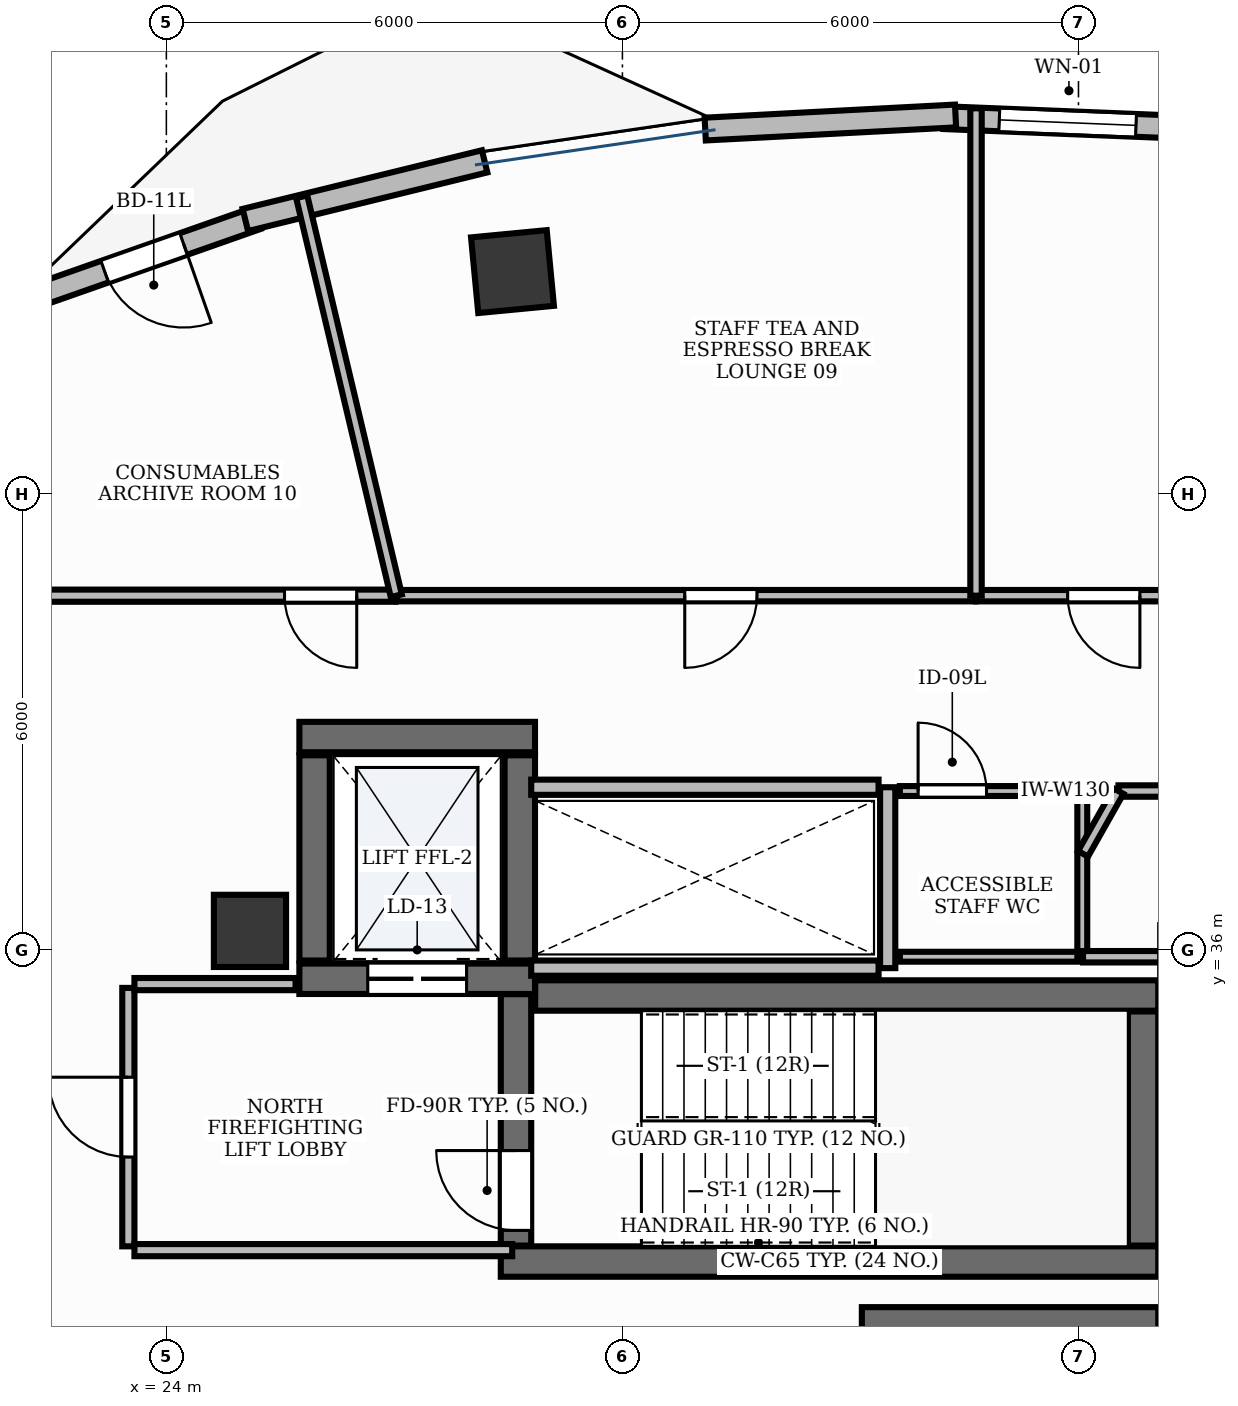
"""IFC4 building model, lengths in metres.
Left out: names, types, materials, properties, quantities, classifications, styles, units other than length and angle.
Written with IfcOpenShell. Run it as: python <this file> out.ifc"""

import sys

from ifc_helpers import new_model, si_unit, direction, frame, frame_2d, origin, origin_2d, place, context, subcontext, project, spatial, rectangle, extrude, element, fill, save


model = new_model("IFC4")
c1 = context("Model", 3, precision=1e-05, world=origin(), true_north=direction((0.0, 1.0)))
c2 = subcontext(c1, "Body", "Model", "MODEL_VIEW")
j1 = project(units=[si_unit("LENGTHUNIT", "METRE"), si_unit("PLANEANGLEUNIT", "RADIAN")], contexts=[c1])
p1 = place(None, origin())
s1 = spatial("IfcSite", under=j1, at=p1, CompositionType="ELEMENT")
p2 = place(p1, origin())
s2 = spatial("IfcBuilding", under=s1, at=p2, CompositionType="ELEMENT")
p3 = place(p2, frame((0.0, 0.0, 204.6)))
s3 = spatial("IfcBuildingStorey", under=s2, at=p3, CompositionType="ELEMENT", Elevation=204.6)
p4 = place(p3, frame((28.852, 35.4, 0.0), z_axis=(0.0, 0.0, 1.0), x_axis=(1.0, 0.0, 0.0)))
e1 = element("IfcWall", 1, at=p4, inside=s3, PredefinedType="SHEAR", context=c2, shape_type="SweptSolid", body=[
    extrude(rectangle(XDim=8.198, YDim=0.4, at=frame_2d((4.099, 0.0))), origin(), (0.0, 0.0, 1.0), 3.9),
])
p5 = place(p3, frame((28.4, 31.9, 0.0), z_axis=(0.0, 0.0, 1.0), x_axis=(1.0, 0.0, 0.0)))
e2 = element("IfcWall", 2, at=p5, inside=s3, PredefinedType="SHEAR", context=c2, shape_type="SweptSolid", body=[
    extrude(rectangle(XDim=8.65, YDim=0.4, at=frame_2d((4.325, 0.0))), origin(), (0.0, 0.0, 1.0), 3.9),
])
p6 = place(p3, frame((36.85, 32.11, 0.0), z_axis=(0.0, 0.0, 1.0), x_axis=(0.0, 1.0, 0.0)))
e3 = element("IfcWall", 3, at=p6, inside=s3, PredefinedType="SHEAR", context=c2, shape_type="SweptSolid", body=[
    extrude(rectangle(XDim=3.08, YDim=0.4, at=frame_2d((1.54, 0.0))), origin(), (0.0, 0.0, 1.0), 3.9),
])
p7 = place(p3, frame((28.6, 32.11, 0.0), z_axis=(0.0, 0.0, 1.0), x_axis=(0.0, 1.0, 0.0)))
e4 = element("IfcWall", 4, at=p7, inside=s3, PredefinedType="SHEAR", context=c2, shape_type="SweptSolid", body=[
    extrude(rectangle(XDim=3.308, YDim=0.4, at=frame_2d((1.654, 0.0))), origin(), (0.0, 0.0, 1.0), 3.9),
])
p8 = place(p7, frame((0.2, 0.0, 0.0)))
e5 = element("IfcOpeningElement", 5, at=p8, cuts=e4, PredefinedType="OPENING", context=c2, shape_type="SweptSolid", body=[
    extrude(rectangle(XDim=1.05, YDim=2.15, at=frame_2d((0.525, 1.075))), frame((0.0, 0.215, 0.0), z_axis=(0.0, -1.0, 0.0), x_axis=(1.0, 0.0, 0.0)), (0.0, 0.0, 1.0), 0.43),
])
p9 = place(p3, frame((33.15, 31.1, 0.0), z_axis=(0.0, 0.0, 1.0), x_axis=(1.0, 0.0, 0.0)))
e6 = element("IfcWall", 6, at=p9, inside=s3, PredefinedType="SHEAR", context=c2, shape_type="SweptSolid", body=[
    extrude(rectangle(XDim=3.9, YDim=0.4, at=frame_2d((1.95, 0.0))), origin(), (0.0, 0.0, 1.0), 3.9),
])
p10 = place(p3, frame((25.75, 38.8, 0.0), z_axis=(0.0, 0.0, 1.0), x_axis=(1.0, 0.0, 0.0)))
e7 = element("IfcWall", 7, at=p10, inside=s3, PredefinedType="SHEAR", context=c2, shape_type="SweptSolid", body=[
    extrude(rectangle(XDim=3.1, YDim=0.4, at=frame_2d((1.55, 0.0))), origin(), (0.0, 0.0, 1.0), 3.9),
])
p11 = place(p3, frame((25.75, 35.62, 0.0), z_axis=(0.0, 0.0, 1.0), x_axis=(1.0, 0.0, 0.0)))
e8 = element("IfcWall", 8, at=p11, inside=s3, PredefinedType="SHEAR", context=c2, shape_type="SweptSolid", body=[
    extrude(rectangle(XDim=3.1, YDim=0.4, at=frame_2d((1.55, 0.0))), origin(), (0.0, 0.0, 1.0), 3.9),
])
p12 = place(p11, frame((0.9, 0.0, 0.0)))
e9 = element("IfcOpeningElement", 9, at=p12, cuts=e8, PredefinedType="OPENING", context=c2, shape_type="SweptSolid", body=[
    extrude(rectangle(XDim=1.3, YDim=2.2, at=frame_2d((0.65, 1.1))), frame((0.0, 0.215, 0.0), z_axis=(0.0, -1.0, 0.0), x_axis=(1.0, 0.0, 0.0)), (0.0, 0.0, 1.0), 0.43),
])
for number, where, z_axis, x_axis in (
    (10, (25.95, 35.86, 0.0), (0.0, 0.0, 1.0), (0.0, 1.0, 0.0)),
    (11, (28.65, 35.86, 0.0), (0.0, 0.0, 1.0), (0.0, 1.0, 0.0)),
):
    element("IfcWall", number, at=place(p3, frame(where, z_axis=z_axis, x_axis=x_axis)), inside=s3, PredefinedType="SHEAR", context=c2, shape_type="SweptSolid", body=[
        extrude(rectangle(XDim=2.7, YDim=0.4, at=frame_2d((1.35, 0.0))), origin(), (0.0, 0.0, 1.0), 3.9),
    ])
p13 = place(p3, frame((25.1, 36.25, -0.0), z_axis=(0.0, 0.0, 1.0), x_axis=(1.0, 0.0, 0.0)))
e12 = element("IfcColumn", 12, at=p13, inside=s3, PredefinedType="PILASTER", context=c2, shape_type="SweptSolid", body=[
    extrude(rectangle(XDim=0.95, YDim=0.95, at=origin_2d()), origin(), (0.0, 0.0, 1.0), 3.901),
])
p14 = place(p3, frame((28.554, 44.924, -0.0), z_axis=(0.0, 0.0, 1.0), x_axis=(0.995462868748, 0.095150811579, 0.0)))
e13 = element("IfcColumn", 13, at=p14, inside=s3, PredefinedType="COLUMN", context=c2, shape_type="SweptSolid", body=[
    extrude(rectangle(XDim=1.0, YDim=1.0, at=origin_2d()), origin(), (0.0, 0.0, 1.0), 3.901),
])
p15 = place(p3, frame((37.486, 46.818, 0.0), z_axis=(0.0, 0.0, 1.0), x_axis=(-0.999187621273, 0.040300092979, 0.0)))
e14 = element("IfcWall", 14, at=p15, inside=s3, PredefinedType="STANDARD", context=c2, shape_type="SweptSolid", body=[
    extrude(rectangle(XDim=3.259, YDim=0.3, at=frame_2d((1.63, 0.0))), origin(), (0.0, 0.0, 1.0), 3.9),
])
p16 = place(p15, frame((0.729, 0.0, 0.9)))
e15 = element("IfcOpeningElement", 15, at=p16, cuts=e14, PredefinedType="OPENING", context=c2, shape_type="SweptSolid", body=[
    extrude(rectangle(XDim=1.8, YDim=2.1, at=frame_2d((0.9, 1.05))), frame((0.0, 0.165, 0.0), z_axis=(0.0, -1.0, 0.0), x_axis=(1.0, 0.0, 0.0)), (0.0, 0.0, 1.0), 0.33),
])
p17 = place(p3, frame((25.193, 45.627, 0.0), z_axis=(0.0, 0.0, 1.0), x_axis=(-0.94341621231, -0.331610992506, 0.0)))
e16 = element("IfcWall", 16, at=p17, inside=s3, PredefinedType="STANDARD", context=c2, shape_type="SweptSolid", body=[
    extrude(rectangle(XDim=3.148, YDim=0.3, at=frame_2d((1.574, 0.0))), origin(), (0.0, 0.0, 1.0), 3.9),
])
p18 = place(p17, frame((1.024, 0.0, 0.0)))
e17 = element("IfcOpeningElement", 17, at=p18, cuts=e16, PredefinedType="OPENING", context=c2, shape_type="SweptSolid", body=[
    extrude(rectangle(XDim=1.1, YDim=2.15, at=frame_2d((0.55, 1.075))), frame((0.0, 0.165, 0.0), z_axis=(0.0, -1.0, 0.0), x_axis=(1.0, 0.0, 0.0)), (0.0, 0.0, 1.0), 0.33),
])
p19 = place(p3, frame((34.383, 46.971, 0.0), z_axis=(0.0, 0.0, 1.0), x_axis=(-0.998633327395, -0.052263538113, 0.0)))
e18 = element("IfcWall", 18, at=p19, inside=s3, PredefinedType="STANDARD", context=c2, shape_type="SweptSolid", body=[
    extrude(rectangle(XDim=3.298, YDim=0.3, at=frame_2d((1.649, 0.0))), origin(), (0.0, 0.0, 1.0), 3.9),
])
p20 = place(p3, frame((28.187, 46.374, 0.0), z_axis=(0.0, 0.0, 1.0), x_axis=(-0.971279195983, -0.237942689423, 0.0)))
e19 = element("IfcWall", 19, at=p20, inside=s3, PredefinedType="STANDARD", context=c2, shape_type="SweptSolid", body=[
    extrude(rectangle(XDim=3.241, YDim=0.3, at=frame_2d((1.621, 0.0))), origin(), (0.0, 0.0, 1.0), 3.9),
])
p21 = place(p3, frame((33.49, 35.76, 0.0), z_axis=(0.0, 0.0, 1.0), x_axis=(0.0, 1.0, 0.0)))
e20 = element("IfcWall", 20, at=p21, inside=s3, PredefinedType="PARTITIONING", context=c2, shape_type="SweptSolid", body=[
    extrude(rectangle(XDim=2.38, YDim=0.2, at=frame_2d((1.19, 0.0))), origin(), (0.0, 0.0, 1.0), 2.91),
])
for number, where, z_axis, x_axis in (
    (21, (28.8, 35.76, 0.0), (0.0, 0.0, 1.0), (1.0, 0.0, 0.0)),
    (22, (28.8, 38.14, 0.0), (0.0, 0.0, 1.0), (1.0, 0.0, 0.0)),
):
    element("IfcWall", number, at=place(p3, frame(where, z_axis=z_axis, x_axis=x_axis)), inside=s3, PredefinedType="PARTITIONING", context=c2, shape_type="SweptSolid", body=[
        extrude(rectangle(XDim=4.57, YDim=0.2, at=frame_2d((2.285, 0.0))), origin(), (0.0, 0.0, 1.0), 2.91),
    ])
p22 = place(p3, frame((23.5, 32.1, 0.0), z_axis=(0.0, 0.0, 1.0), x_axis=(0.0, 1.0, 0.0)))
e23 = element("IfcWall", 23, at=p22, inside=s3, PredefinedType="PARTITIONING", context=c2, shape_type="SweptSolid", body=[
    extrude(rectangle(XDim=3.4, YDim=0.16, at=frame_2d((1.7, 0.0))), origin(), (0.0, 0.0, 1.0), 2.91),
])
p23 = place(p22, frame((1.175, 0.0, 0.0)))
e24 = element("IfcOpeningElement", 24, at=p23, cuts=e23, PredefinedType="OPENING", context=c2, shape_type="SweptSolid", body=[
    extrude(rectangle(XDim=1.05, YDim=2.15, at=frame_2d((0.525, 1.075))), frame((0.0, 0.095, 0.0), z_axis=(0.0, -1.0, 0.0), x_axis=(1.0, 0.0, 0.0)), (0.0, 0.0, 1.0), 0.19),
])
p24 = place(p3, frame((23.58, 32.05, 0.0), z_axis=(0.0, 0.0, 1.0), x_axis=(1.0, 0.0, 0.0)))
e25 = element("IfcWall", 25, at=p24, inside=s3, PredefinedType="PARTITIONING", context=c2, shape_type="SweptSolid", body=[
    extrude(rectangle(XDim=4.97, YDim=0.16, at=frame_2d((2.485, 0.0))), origin(), (0.0, 0.0, 1.0), 2.91),
])
p25 = place(p3, frame((23.58, 35.55, 0.0), z_axis=(0.0, 0.0, 1.0), x_axis=(1.0, 0.0, 0.0)))
e26 = element("IfcWall", 26, at=p25, inside=s3, PredefinedType="PARTITIONING", context=c2, shape_type="SweptSolid", body=[
    extrude(rectangle(XDim=2.12, YDim=0.16, at=frame_2d((1.06, 0.0))), origin(), (0.0, 0.0, 1.0), 2.91),
])
p26 = place(p3, frame((33.65, 38.09, 0.0), z_axis=(0.0, 0.0, 1.0), x_axis=(1.0, 0.0, 0.0)))
e27 = element("IfcWall", 27, at=p26, inside=s3, PredefinedType="PARTITIONING", context=c2, shape_type="SweptSolid", body=[
    extrude(rectangle(XDim=2.4, YDim=0.13, at=frame_2d((1.2, 0.0))), origin(), (0.0, 0.0, 1.0), 2.91),
])
p27 = place(p26, frame((0.24, 0.0, 0.0)))
e28 = element("IfcOpeningElement", 28, at=p27, cuts=e27, PredefinedType="OPENING", context=c2, shape_type="SweptSolid", body=[
    extrude(rectangle(XDim=0.9, YDim=2.15, at=frame_2d((0.45, 1.075))), frame((0.0, 0.08, 0.0), z_axis=(0.0, -1.0, 0.0), x_axis=(1.0, 0.0, 0.0)), (0.0, 0.0, 1.0), 0.16),
])
p28 = place(p3, frame((37.2, 40.66, 0.0), z_axis=(0.0, 0.0, 1.0), x_axis=(-1.0, 0.0, 0.0)))
e29 = element("IfcWall", 29, at=p28, inside=s3, PredefinedType="PARTITIONING", context=c2, shape_type="SweptSolid", body=[
    extrude(rectangle(XDim=2.548, YDim=0.15, at=frame_2d((1.274, 0.0))), origin(), (0.0, 0.0, 1.0), 2.91),
])
p29 = place(p28, frame((0.392, 0.0, 0.0)))
e30 = element("IfcOpeningElement", 30, at=p29, cuts=e29, PredefinedType="OPENING", context=c2, shape_type="SweptSolid", body=[
    extrude(rectangle(XDim=0.95, YDim=2.15, at=frame_2d((0.475, 1.075))), frame((0.0, 0.09, 0.0), z_axis=(0.0, -1.0, 0.0), x_axis=(1.0, 0.0, 0.0)), (0.0, 0.0, 1.0), 0.18),
])
p30 = place(p3, frame((34.642, 40.66, 0.0), z_axis=(0.0, 0.0, 1.0), x_axis=(-1.0, 0.0, 0.0)))
e31 = element("IfcWall", 31, at=p30, inside=s3, PredefinedType="PARTITIONING", context=c2, shape_type="SweptSolid", body=[
    extrude(rectangle(XDim=7.617, YDim=0.15, at=frame_2d((3.809, 0.0))), origin(), (0.0, 0.0, 1.0), 2.91),
])
p31 = place(p30, frame((2.872, 0.0, 0.0)))
e32 = element("IfcOpeningElement", 32, at=p31, cuts=e31, PredefinedType="OPENING", context=c2, shape_type="SweptSolid", body=[
    extrude(rectangle(XDim=0.95, YDim=2.15, at=frame_2d((0.475, 1.075))), frame((0.0, 0.09, 0.0), z_axis=(0.0, -1.0, 0.0), x_axis=(1.0, 0.0, 0.0)), (0.0, 0.0, 1.0), 0.18),
])
p32 = place(p3, frame((27.015, 40.66, 0.0), z_axis=(0.0, 0.0, 1.0), x_axis=(-1.0, 0.0, 0.0)))
e33 = element("IfcWall", 33, at=p32, inside=s3, PredefinedType="PARTITIONING", context=c2, shape_type="SweptSolid", body=[
    extrude(rectangle(XDim=5.265, YDim=0.16, at=frame_2d((2.632, 0.0))), origin(), (0.0, 0.0, 1.0), 2.91),
])
p33 = place(p32, frame((0.51, 0.0, 0.0)))
e34 = element("IfcOpeningElement", 34, at=p33, cuts=e33, PredefinedType="OPENING", context=c2, shape_type="SweptSolid", body=[
    extrude(rectangle(XDim=0.95, YDim=2.15, at=frame_2d((0.475, 1.075))), frame((0.0, 0.095, 0.0), z_axis=(0.0, -1.0, 0.0), x_axis=(1.0, 0.0, 0.0)), (0.0, 0.0, 1.0), 0.19),
])
p34 = place(p3, frame((36.05, 35.91, 0.0), z_axis=(0.0, 0.0, 1.0), x_axis=(-1.0, 0.0, 0.0)))
e35 = element("IfcWall", 35, at=p34, inside=s3, PredefinedType="PARTITIONING", context=c2, shape_type="SweptSolid", body=[
    extrude(rectangle(XDim=2.4, YDim=0.13, at=frame_2d((1.2, 0.0))), origin(), (0.0, 0.0, 1.0), 2.91),
])
p35 = place(p3, frame((36.05, 38.09, 0.0), z_axis=(0.0, 0.0, 1.0), x_axis=(0.0, -1.0, 0.0)))
e36 = element("IfcWall", 36, at=p35, inside=s3, PredefinedType="PARTITIONING", context=c2, shape_type="SweptSolid", body=[
    extrude(rectangle(XDim=2.18, YDim=0.13, at=frame_2d((1.09, 0.0))), origin(), (0.0, 0.0, 1.0), 2.91),
])
p36 = place(p3, frame((36.526, 38.09, 0.0), z_axis=(0.0, 0.0, 1.0), x_axis=(1.0, 0.0, 0.0)))
e37 = element("IfcWall", 37, at=p36, inside=s3, PredefinedType="PARTITIONING", context=c2, shape_type="SweptSolid", body=[
    extrude(rectangle(XDim=0.674, YDim=0.15, at=frame_2d((0.337, 0.0))), origin(), (0.0, 0.0, 1.0), 2.91),
])
p37 = place(p3, frame((34.652, 40.66, 0.0), z_axis=(0.0, 0.0, 1.0), x_axis=(0.0, 1.0, 0.0)))
e38 = element("IfcWall", 38, at=p37, inside=s3, PredefinedType="PARTITIONING", context=c2, shape_type="SweptSolid", body=[
    extrude(rectangle(XDim=6.412, YDim=0.15, at=frame_2d((3.206, 0.0))), origin(), (0.0, 0.0, 1.0), 2.91),
])
p38 = place(p3, frame((37.35, 35.91, 0.0), z_axis=(0.0, 0.0, 1.0), x_axis=(-1.0, 0.0, 0.0)))
e39 = element("IfcWall", 39, at=p38, inside=s3, PredefinedType="PARTITIONING", context=c2, shape_type="SweptSolid", body=[
    extrude(rectangle(XDim=1.29, YDim=0.15, at=frame_2d((0.645, 0.0))), origin(), (0.0, 0.0, 1.0), 2.91),
])
p39 = place(p3, frame((36.06, 37.264, 0.0), z_axis=(0.0, 0.0, 1.0), x_axis=(0.491641592744, 0.8707976483, 0.0)))
e40 = element("IfcWall", 40, at=p39, inside=s3, PredefinedType="PARTITIONING", context=c2, shape_type="SweptSolid", body=[
    extrude(rectangle(XDim=0.948, YDim=0.15, at=frame_2d((0.474, 0.0))), origin(), (0.0, 0.0, 1.0), 2.91),
])
p40 = place(p3, frame((27.025, 40.66, 0.0), z_axis=(0.0, 0.0, 1.0), x_axis=(-0.230673918081, 0.973031111279, 0.0)))
e41 = element("IfcWall", 41, at=p40, inside=s3, PredefinedType="PARTITIONING", context=c2, shape_type="SweptSolid", body=[
    extrude(rectangle(XDim=5.394, YDim=0.15, at=frame_2d((2.697, 0.0))), origin(), (0.0, 0.0, 1.0), 2.91),
])
p41 = place(p16, origin())
e42 = element("IfcWindow", 42, at=p41, inside=s3, PartitioningType="SINGLE_PANEL", PredefinedType="WINDOW", context=c2, shape_type="SweptSolid", body=[
    extrude(rectangle(XDim=1.8, YDim=2.1, at=frame_2d((0.9, 1.05))), frame((0.0, 0.03, 0.0), z_axis=(0.0, -1.0, 0.0), x_axis=(1.0, 0.0, 0.0)), (0.0, 0.0, 1.0), 0.06),
])
fill(e15, e42)
p42 = place(p18, origin())
e43 = element("IfcDoor", 43, at=p42, inside=s3, OperationType="SINGLE_SWING_LEFT", PredefinedType="DOOR", context=c2, shape_type="SweptSolid", body=[
    extrude(rectangle(XDim=1.1, YDim=2.15, at=frame_2d((0.55, 1.075))), frame((0.0, 0.025, 0.0), z_axis=(0.0, -1.0, 0.0), x_axis=(1.0, 0.0, 0.0)), (0.0, 0.0, 1.0), 0.05),
])
fill(e17, e43)
p43 = place(p8, origin())
e44 = element("IfcDoor", 44, at=p43, inside=s3, OperationType="SINGLE_SWING_RIGHT", PredefinedType="DOOR", context=c2, shape_type="SweptSolid", body=[
    extrude(rectangle(XDim=1.05, YDim=2.15, at=frame_2d((0.525, 1.075))), frame((0.0, 0.025, 0.0), z_axis=(0.0, -1.0, 0.0), x_axis=(1.0, 0.0, 0.0)), (0.0, 0.0, 1.0), 0.05),
])
fill(e5, e44)
p44 = place(p12, origin())
e45 = element("IfcDoor", 45, at=p44, inside=s3, OperationType="DOUBLE_DOOR_SLIDING", PredefinedType="DOOR", context=c2, shape_type="SweptSolid", body=[
    extrude(rectangle(XDim=1.3, YDim=2.2, at=frame_2d((0.65, 1.1))), frame((0.0, 0.025, 0.0), z_axis=(0.0, -1.0, 0.0), x_axis=(1.0, 0.0, 0.0)), (0.0, 0.0, 1.0), 0.05),
])
fill(e9, e45)
p45 = place(p23, origin())
e46 = element("IfcDoor", 46, at=p45, inside=s3, OperationType="SINGLE_SWING_RIGHT", PredefinedType="DOOR", context=c2, shape_type="SweptSolid", body=[
    extrude(rectangle(XDim=1.05, YDim=2.15, at=frame_2d((0.525, 1.075))), frame((0.0, 0.025, 0.0), z_axis=(0.0, -1.0, 0.0), x_axis=(1.0, 0.0, 0.0)), (0.0, 0.0, 1.0), 0.05),
])
fill(e24, e46)
p46 = place(p27, origin())
e47 = element("IfcDoor", 47, at=p46, inside=s3, OperationType="SINGLE_SWING_LEFT", PredefinedType="DOOR", context=c2, shape_type="SweptSolid", body=[
    extrude(rectangle(XDim=0.9, YDim=2.15, at=frame_2d((0.45, 1.075))), frame((0.0, 0.025, 0.0), z_axis=(0.0, -1.0, 0.0), x_axis=(1.0, 0.0, 0.0)), (0.0, 0.0, 1.0), 0.05),
])
fill(e28, e47)
p47 = place(p29, origin())
e48 = element("IfcDoor", 48, at=p47, inside=s3, OperationType="SINGLE_SWING_LEFT", PredefinedType="DOOR", context=c2, shape_type="SweptSolid", body=[
    extrude(rectangle(XDim=0.95, YDim=2.15, at=frame_2d((0.475, 1.075))), frame((0.0, 0.025, 0.0), z_axis=(0.0, -1.0, 0.0), x_axis=(1.0, 0.0, 0.0)), (0.0, 0.0, 1.0), 0.05),
])
fill(e30, e48)
p48 = place(p31, origin())
e49 = element("IfcDoor", 49, at=p48, inside=s3, OperationType="SINGLE_SWING_RIGHT", PredefinedType="DOOR", context=c2, shape_type="SweptSolid", body=[
    extrude(rectangle(XDim=0.95, YDim=2.15, at=frame_2d((0.475, 1.075))), frame((0.0, 0.025, 0.0), z_axis=(0.0, -1.0, 0.0), x_axis=(1.0, 0.0, 0.0)), (0.0, 0.0, 1.0), 0.05),
])
fill(e32, e49)
p49 = place(p33, origin())
e50 = element("IfcDoor", 50, at=p49, inside=s3, OperationType="SINGLE_SWING_LEFT", PredefinedType="DOOR", context=c2, shape_type="SweptSolid", body=[
    extrude(rectangle(XDim=0.95, YDim=2.15, at=frame_2d((0.475, 1.075))), frame((0.0, 0.025, 0.0), z_axis=(0.0, -1.0, 0.0), x_axis=(1.0, 0.0, 0.0)), (0.0, 0.0, 1.0), 0.05),
])
fill(e34, e50)
save(model, sys.argv[1])
